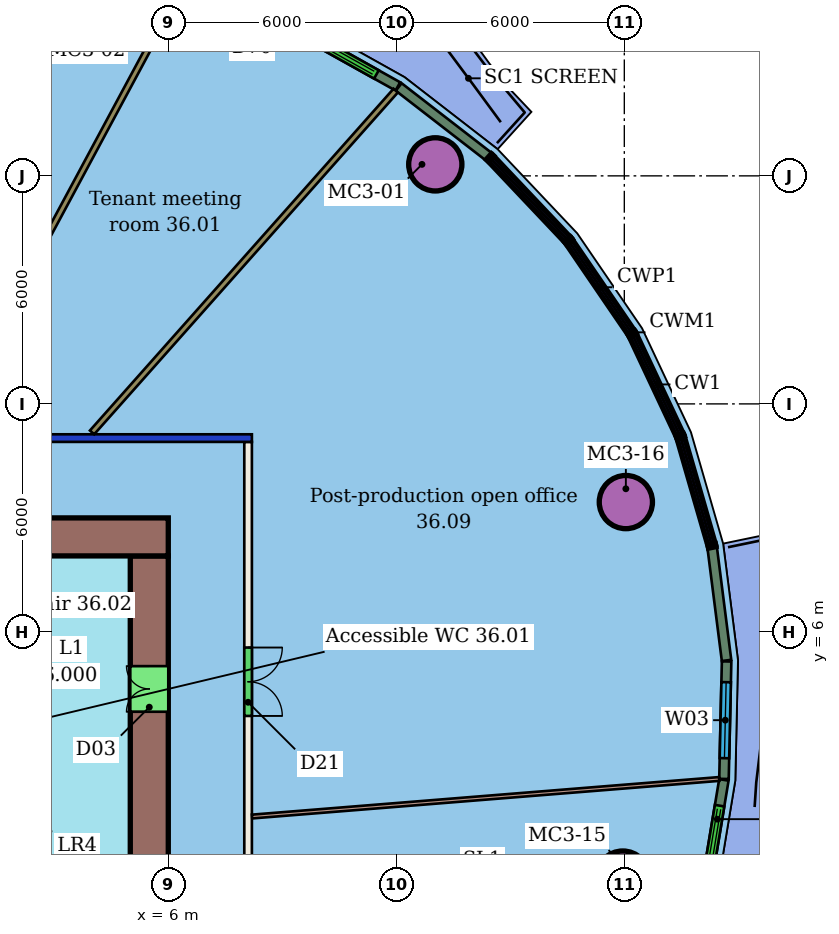
"""IFC4 building model, lengths in metres.
Left out: names, types, materials, properties, quantities, classifications, styles, units other than length and angle.
Written with IfcOpenShell. Run it as: python <this file> out.ifc"""

import sys

from ifc_helpers import new_model, si_unit, direction, frame, frame_2d, origin, origin_2d, place, context, subcontext, project, spatial, rectangle, hollow_circle, extrude, element, fill, save


model = new_model("IFC4")
c1 = context("Model", 3, precision=1e-05, world=origin(), true_north=direction((0.0, 1.0)))
c2 = subcontext(c1, "Body", "Model", "MODEL_VIEW")
j1 = project(units=[si_unit("LENGTHUNIT", "METRE"), si_unit("PLANEANGLEUNIT", "RADIAN")], contexts=[c1])
p1 = place(None, origin())
s1 = spatial("IfcSite", under=j1, at=p1, CompositionType="ELEMENT")
p2 = place(p1, origin())
s2 = spatial("IfcBuilding", under=s1, at=p2, CompositionType="ELEMENT")
p3 = place(p2, frame((0.0, 0.0, 154.2)))
s3 = spatial("IfcBuildingStorey", under=s2, at=p3, CompositionType="ELEMENT", Elevation=154.2)
for number, where, z_axis, x_axis in (
    (1, (13.026, 18.303, 0.0), (0.0, 0.0, 1.0), (1.0, 0.0, 0.0)),
    (2, (17.959, -0.464, 0.0), (0.0, 0.0, 1.0), (1.0, 0.0, 0.0)),
    (3, (18.041, 9.417, 0.0), (0.0, 0.0, 1.0), (1.0, 0.0, 0.0)),
):
    element("IfcColumn", number, at=place(p3, frame(where, z_axis=z_axis, x_axis=x_axis)), inside=s3, PredefinedType="COLUMN", context=c2, shape_type="SweptSolid", body=[
        extrude(hollow_circle(Radius=0.7, WallThickness=0.05, at=origin_2d()), origin(), (0.0, 0.0, 1.0), 3.45),
    ])
p4 = place(p3, frame((-20.2, 11.1, 0.0), z_axis=(0.0, 0.0, 1.0), x_axis=(1.0, 0.0, 0.0)))
e4 = element("IfcWall", 4, at=p4, inside=s3, PredefinedType="PARTITIONING", context=c2, shape_type="SweptSolid", body=[
    extrude(rectangle(XDim=28.4, YDim=0.2, at=frame_2d((14.2, 0.0))), origin(), (0.0, 0.0, 1.0), 3.05),
])
p5 = place(p4, frame((21.299, 0.0, 0.0)))
e5 = element("IfcOpeningElement", 5, at=p5, cuts=e4, PredefinedType="OPENING", context=c2, shape_type="SweptSolid", body=[
    extrude(rectangle(XDim=0.9, YDim=2.1, at=frame_2d((0.45, 1.05))), frame((0.0, 0.11, 0.0), z_axis=(0.0, -1.0, 0.0), x_axis=(1.0, 0.0, 0.0)), (0.0, 0.0, 1.0), 0.22),
])
p6 = place(p4, frame((15.033, 0.0, 0.0)))
e6 = element("IfcOpeningElement", 6, at=p6, cuts=e4, PredefinedType="OPENING", context=c2, shape_type="SweptSolid", body=[
    extrude(rectangle(XDim=1.8, YDim=2.1, at=frame_2d((0.9, 1.05))), frame((0.0, 0.11, 0.0), z_axis=(0.0, -1.0, 0.0), x_axis=(1.0, 0.0, 0.0)), (0.0, 0.0, 1.0), 0.22),
])
p7 = place(p4, frame((4.487, 0.0, 0.0)))
e7 = element("IfcOpeningElement", 7, at=p7, cuts=e4, PredefinedType="OPENING", context=c2, shape_type="SweptSolid", body=[
    extrude(rectangle(XDim=1.1, YDim=2.1, at=frame_2d((0.55, 1.05))), frame((0.0, 0.11, 0.0), z_axis=(0.0, -1.0, 0.0), x_axis=(1.0, 0.0, 0.0)), (0.0, 0.0, 1.0), 0.22),
])
p8 = place(p3, frame((8.1, 11.0, 0.0), z_axis=(0.0, 0.0, 1.0), x_axis=(0.0, -1.0, 0.0)))
e8 = element("IfcWall", 8, at=p8, inside=s3, PredefinedType="PARTITIONING", context=c2, shape_type="SweptSolid", body=[
    extrude(rectangle(XDim=22.0, YDim=0.2, at=frame_2d((11.0, 0.0))), origin(), (0.0, 0.0, 1.0), 3.45),
])
p9 = place(p8, frame((13.221, 0.0, 0.0)))
e9 = element("IfcOpeningElement", 9, at=p9, cuts=e8, PredefinedType="OPENING", context=c2, shape_type="SweptSolid", body=[
    extrude(rectangle(XDim=1.8, YDim=2.1, at=frame_2d((0.9, 1.05))), frame((0.0, 0.11, 0.0), z_axis=(0.0, -1.0, 0.0), x_axis=(1.0, 0.0, 0.0)), (0.0, 0.0, 1.0), 0.22),
])
p10 = place(p8, frame((5.411, 0.0, 0.0)))
e10 = element("IfcOpeningElement", 10, at=p10, cuts=e8, PredefinedType="OPENING", context=c2, shape_type="SweptSolid", body=[
    extrude(rectangle(XDim=1.8, YDim=2.1, at=frame_2d((0.9, 1.05))), frame((0.0, 0.11, 0.0), z_axis=(0.0, -1.0, 0.0), x_axis=(1.0, 0.0, 0.0)), (0.0, 0.0, 1.0), 0.22),
])
p11 = place(p3, frame((11.983, 20.243, 0.0), z_axis=(0.0, 0.0, 1.0), x_axis=(-0.664145873582, -0.747603008691, 0.0)))
e11 = element("IfcWall", 11, at=p11, inside=s3, PredefinedType="PARTITIONING", context=c2, shape_type="SweptSolid", body=[
    extrude(rectangle(XDim=12.029, YDim=0.15, at=frame_2d((6.015, 0.0))), origin(), (0.0, 0.0, 1.0), 3.45),
])
p12 = place(p3, frame((6.307, 22.898, 0.0), z_axis=(0.0, 0.0, 1.0), x_axis=(-0.473431131889, -0.88083083697, 0.0)))
e12 = element("IfcWall", 12, at=p12, inside=s3, PredefinedType="PARTITIONING", context=c2, shape_type="SweptSolid", body=[
    extrude(rectangle(XDim=13.24, YDim=0.15, at=frame_2d((6.62, 0.0))), origin(), (0.0, 0.0, 1.0), 3.45),
])
p13 = place(p3, frame((20.498, 2.131, 0.0), z_axis=(0.0, 0.0, 1.0), x_axis=(-0.996782781299, -0.080150401777, 0.0)))
e13 = element("IfcWall", 13, at=p13, inside=s3, PredefinedType="PARTITIONING", context=c2, shape_type="SweptSolid", body=[
    extrude(rectangle(XDim=12.333, YDim=0.1, at=frame_2d((6.167, 0.0))), origin(), (0.0, 0.0, 1.0), 3.45),
])
p14 = place(p3, frame((14.421, 18.513, 0.0), z_axis=(0.0, 0.0, 1.0), x_axis=(-0.790822117726, 0.612046058818, 0.0)))
e14 = element("IfcWall", 14, at=p14, inside=s3, PredefinedType="SOLIDWALL", context=c2, shape_type="SweptSolid", body=[
    extrude(rectangle(XDim=2.982, YDim=0.25, at=frame_2d((1.491, 0.0))), origin(), (0.0, 0.0, 1.0), 3.1),
])
p15 = place(p3, frame((12.041, 20.354, 0.0), z_axis=(0.0, 0.0, 1.0), x_axis=(-0.872921725824, 0.487860287976, 0.0)))
e15 = element("IfcWall", 15, at=p15, inside=s3, PredefinedType="SOLIDWALL", context=c2, shape_type="SweptSolid", body=[
    extrude(rectangle(XDim=3.092, YDim=0.25, at=frame_2d((1.546, 0.0))), origin(), (0.0, 0.0, 1.0), 3.1),
])
p16 = place(p15, frame((0.646, 0.0, 0.0)))
e16 = element("IfcOpeningElement", 16, at=p16, cuts=e15, PredefinedType="OPENING", context=c2, shape_type="SweptSolid", body=[
    extrude(rectangle(XDim=1.8, YDim=2.4, at=frame_2d((0.9, 1.2))), frame((0.0, 0.135, 0.0), z_axis=(0.0, -1.0, 0.0), x_axis=(1.0, 0.0, 0.0)), (0.0, 0.0, 1.0), 0.27),
])
p17 = place(p3, frame((20.1, -1.025, 0.0), z_axis=(0.0, 0.0, 1.0), x_axis=(0.163912512181, 0.986474879736, 0.0)))
e17 = element("IfcWall", 17, at=p17, inside=s3, PredefinedType="SOLIDWALL", context=c2, shape_type="SweptSolid", body=[
    extrude(rectangle(XDim=3.174, YDim=0.25, at=frame_2d((1.587, 0.0))), origin(), (0.0, 0.0, 1.0), 3.1),
])
p18 = place(p17, frame((0.687, 0.0, 0.0)))
e18 = element("IfcOpeningElement", 18, at=p18, cuts=e17, PredefinedType="OPENING", context=c2, shape_type="SweptSolid", body=[
    extrude(rectangle(XDim=1.8, YDim=2.4, at=frame_2d((0.9, 1.2))), frame((0.0, 0.135, 0.0), z_axis=(0.0, -1.0, 0.0), x_axis=(1.0, 0.0, 0.0)), (0.0, 0.0, 1.0), 0.27),
])
p19 = place(p3, frame((20.623, 2.132, 0.0), z_axis=(0.0, 0.0, 1.0), x_axis=(0.022342995581, 0.999750364115, 0.0)))
e19 = element("IfcWall", 19, at=p19, inside=s3, PredefinedType="SOLIDWALL", context=c2, shape_type="SweptSolid", body=[
    extrude(rectangle(XDim=3.092, YDim=0.25, at=frame_2d((1.546, 0.0))), origin(), (0.0, 0.0, 1.0), 3.1),
])
p20 = place(p19, frame((0.546, 0.0, 0.9)))
e20 = element("IfcOpeningElement", 20, at=p20, cuts=e19, PredefinedType="OPENING", context=c2, shape_type="SweptSolid", body=[
    extrude(rectangle(XDim=2.0, YDim=2.1, at=frame_2d((1.0, 1.05))), frame((0.0, 0.135, 0.0), z_axis=(0.0, -1.0, 0.0), x_axis=(1.0, 0.0, 0.0)), (0.0, 0.0, 1.0), 0.27),
])
p21 = place(p3, frame((20.69, 5.25, 0.0), z_axis=(0.0, 0.0, 1.0), x_axis=(-0.1263011447, 0.991991945959, 0.0)))
e21 = element("IfcWall", 21, at=p21, inside=s3, PredefinedType="SOLIDWALL", context=c2, shape_type="SweptSolid", body=[
    extrude(rectangle(XDim=2.983, YDim=0.25, at=frame_2d((1.491, 0.0))), origin(), (0.0, 0.0, 1.0), 3.1),
])
p22 = place(p3, frame((6.0, 8.5, 0.0), z_axis=(0.0, 0.0, 1.0), x_axis=(-1.0, 0.0, 0.0)))
e22 = element("IfcWall", 22, at=p22, inside=s3, PredefinedType="SHEAR", context=c2, shape_type="SweptSolid", body=[
    extrude(rectangle(XDim=12.0, YDim=1.0, at=frame_2d((6.0, 0.0))), origin(), (0.0, 0.0, 1.0), 3.3),
])
p23 = place(p22, frame((5.6, 0.0, 0.0)))
e23 = element("IfcOpeningElement", 23, at=p23, cuts=e22, PredefinedType="OPENING", context=c2, shape_type="SweptSolid", body=[
    extrude(rectangle(XDim=1.2, YDim=2.1, at=frame_2d((0.6, 1.05))), frame((0.0, 0.51, 0.0), z_axis=(0.0, -1.0, 0.0), x_axis=(1.0, 0.0, 0.0)), (0.0, 0.0, 1.0), 1.02),
])
p24 = place(p3, frame((5.5, -8.0, 0.0), z_axis=(0.0, 0.0, 1.0), x_axis=(0.0, 1.0, 0.0)))
e24 = element("IfcWall", 24, at=p24, inside=s3, PredefinedType="SHEAR", context=c2, shape_type="SweptSolid", body=[
    extrude(rectangle(XDim=16.0, YDim=1.0, at=frame_2d((8.0, 0.0))), origin(), (0.0, 0.0, 1.0), 3.3),
])
p25 = place(p24, frame((2.9, 0.0, 0.0)))
e25 = element("IfcOpeningElement", 25, at=p25, cuts=e24, PredefinedType="OPENING", context=c2, shape_type="SweptSolid", body=[
    extrude(rectangle(XDim=1.2, YDim=2.1, at=frame_2d((0.6, 1.05))), frame((0.0, 0.51, 0.0), z_axis=(0.0, -1.0, 0.0), x_axis=(1.0, 0.0, 0.0)), (0.0, 0.0, 1.0), 1.02),
])
p26 = place(p24, frame((11.9, 0.0, 0.0)))
e26 = element("IfcOpeningElement", 26, at=p26, cuts=e24, PredefinedType="OPENING", context=c2, shape_type="SweptSolid", body=[
    extrude(rectangle(XDim=1.2, YDim=2.1, at=frame_2d((0.6, 1.05))), frame((0.0, 0.51, 0.0), z_axis=(0.0, -1.0, 0.0), x_axis=(1.0, 0.0, 0.0)), (0.0, 0.0, 1.0), 1.02),
])
p27 = place(p10, origin())
e27 = element("IfcDoor", 27, at=p27, inside=s3, OperationType="DOUBLE_DOOR_SINGLE_SWING", PredefinedType="DOOR", context=c2, shape_type="SweptSolid", body=[
    extrude(rectangle(XDim=1.8, YDim=2.1, at=frame_2d((0.9, 1.05))), frame((0.0, 0.025, 0.0), z_axis=(0.0, -1.0, 0.0), x_axis=(1.0, 0.0, 0.0)), (0.0, 0.0, 1.0), 0.05),
])
fill(e10, e27)
p28 = place(p16, origin())
e28 = element("IfcDoor", 28, at=p28, inside=s3, OperationType="DOUBLE_DOOR_SLIDING", PredefinedType="DOOR", context=c2, shape_type="SweptSolid", body=[
    extrude(rectangle(XDim=1.8, YDim=2.4, at=frame_2d((0.9, 1.2))), frame((0.0, 0.025, 0.0), z_axis=(0.0, -1.0, 0.0), x_axis=(1.0, 0.0, 0.0)), (0.0, 0.0, 1.0), 0.05),
])
fill(e16, e28)
p29 = place(p18, origin())
e29 = element("IfcDoor", 29, at=p29, inside=s3, OperationType="DOUBLE_DOOR_SLIDING", PredefinedType="DOOR", context=c2, shape_type="SweptSolid", body=[
    extrude(rectangle(XDim=1.8, YDim=2.4, at=frame_2d((0.9, 1.2))), frame((0.0, 0.025, 0.0), z_axis=(0.0, -1.0, 0.0), x_axis=(1.0, 0.0, 0.0)), (0.0, 0.0, 1.0), 0.05),
])
fill(e18, e29)
p30 = place(p20, origin())
e30 = element("IfcWindow", 30, at=p30, inside=s3, PartitioningType="SINGLE_PANEL", PredefinedType="WINDOW", context=c2, shape_type="SweptSolid", body=[
    extrude(rectangle(XDim=2.0, YDim=2.1, at=frame_2d((1.0, 1.05))), frame((0.0, 0.03, 0.0), z_axis=(0.0, -1.0, 0.0), x_axis=(1.0, 0.0, 0.0)), (0.0, 0.0, 1.0), 0.06),
])
fill(e20, e30)
p31 = place(p26, origin())
e31 = element("IfcDoor", 31, at=p31, inside=s3, OperationType="DOUBLE_DOOR_SINGLE_SWING", PredefinedType="NOTDEFINED", context=c2, shape_type="SweptSolid", body=[
    extrude(rectangle(XDim=1.2, YDim=2.1, at=frame_2d((0.6, 1.05))), frame((0.0, 0.025, 0.0), z_axis=(0.0, -1.0, 0.0), x_axis=(1.0, 0.0, 0.0)), (0.0, 0.0, 1.0), 0.05),
])
fill(e26, e31)
save(model, sys.argv[1])
